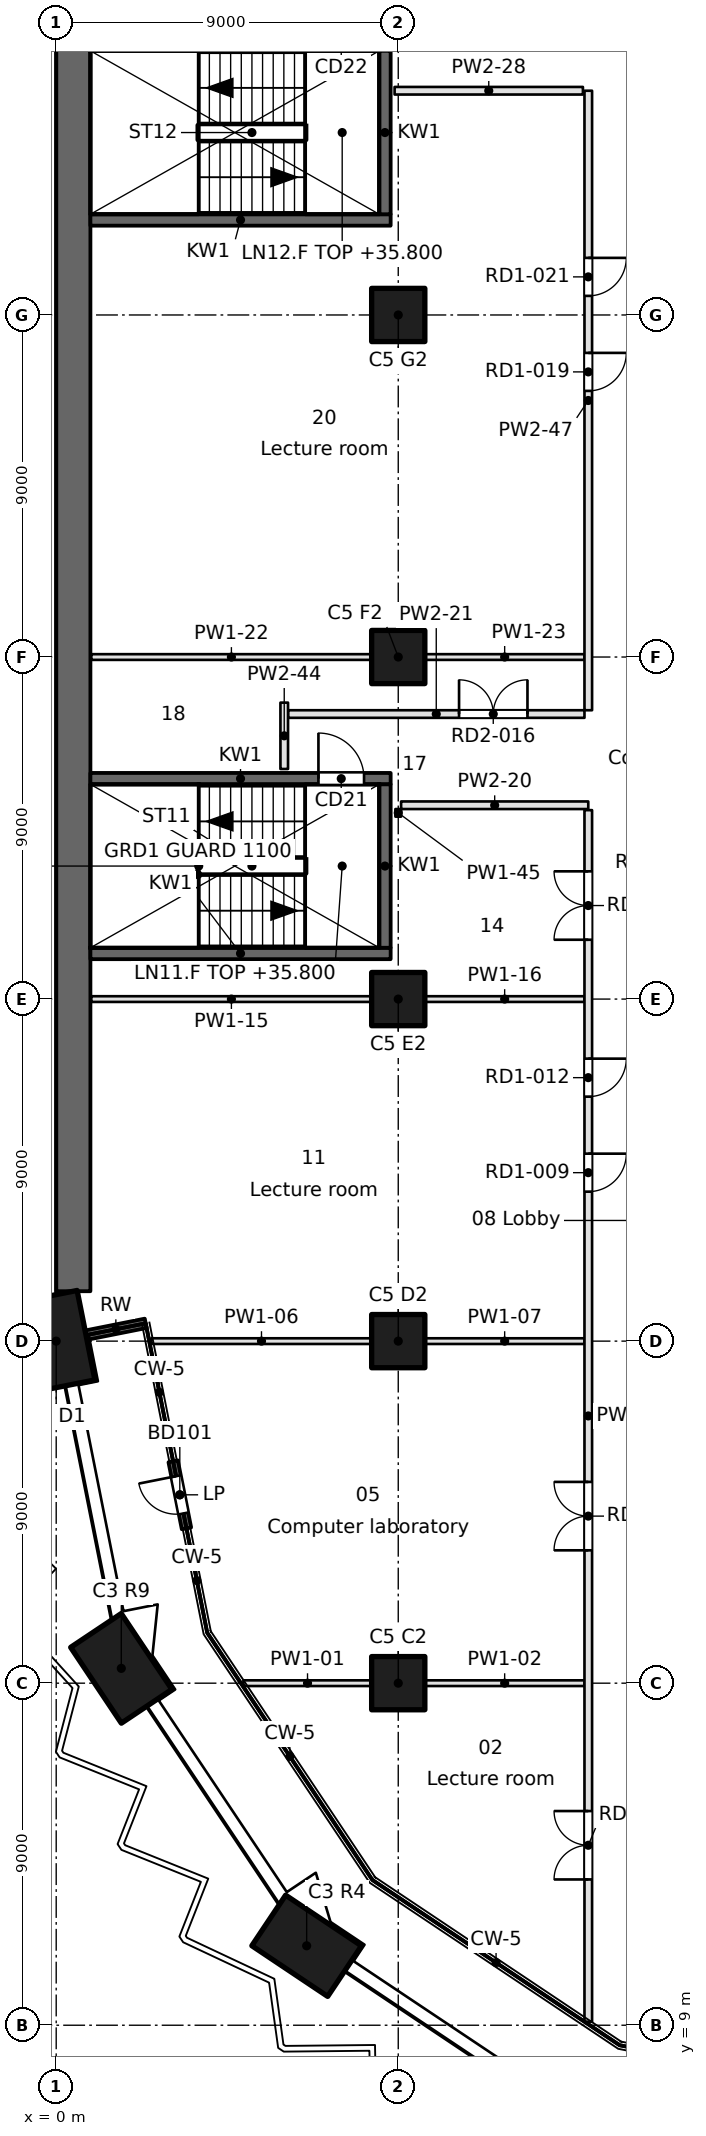
"""IFC4 building model, lengths in metres.
Left out: names, types, materials, properties, quantities, classifications, styles, units other than length and angle.
Written with IfcOpenShell. Run it as: python <this file> out.ifc"""

import sys

from ifc_helpers import new_model, si_unit, direction, frame, frame_2d, origin, origin_2d, place, context, subcontext, project, spatial, rectangle, extrude, element, fill, save


model = new_model("IFC4")
c1 = context("Model", 3, precision=1e-05, world=origin(), true_north=direction((0.0, 1.0)))
c2 = subcontext(c1, "Body", "Model", "MODEL_VIEW")
j1 = project(units=[si_unit("LENGTHUNIT", "METRE"), si_unit("PLANEANGLEUNIT", "RADIAN")], contexts=[c1])
p1 = place(None, origin())
s1 = spatial("IfcSite", under=j1, at=p1, CompositionType="ELEMENT")
p2 = place(p1, origin())
s2 = spatial("IfcBuilding", under=s1, at=p2, CompositionType="ELEMENT")
p3 = place(p2, frame((0.0, 0.0, 35.8)))
s3 = spatial("IfcBuildingStorey", under=s2, at=p3, CompositionType="ELEMENT", Elevation=35.8)
for number, where, z_axis, x_axis in (
    (1, (6.59, 11.09, 0.0), (0.0, 0.0, 1.0), (-0.831, 0.556, 0.0)),
    (2, (1.713, 18.39, 0.0), (0.0, 0.0, 1.0), (-0.556, 0.831, 0.0)),
    (3, (0.0, 27.0, 0.0), (0.0, 0.0, 1.0), (-0.195, 0.981, 0.0)),
):
    element("IfcColumn", number, at=place(p3, frame(where, z_axis=z_axis, x_axis=x_axis)), inside=s3, PredefinedType="COLUMN", context=c2, shape_type="SweptSolid", body=[
        extrude(rectangle(XDim=2.4, YDim=1.6, at=origin_2d()), origin(), (0.0, 0.0, 1.0), 3.7),
    ])
for number, where, z_axis, x_axis in (
    (4, (9.0, 18.0, 0.0), (0.0, 0.0, 1.0), (1.0, 0.0, 0.0)),
    (5, (9.0, 27.0, 0.0), (0.0, 0.0, 1.0), (1.0, 0.0, 0.0)),
    (6, (9.0, 36.0, 0.0), (0.0, 0.0, 1.0), (1.0, 0.0, 0.0)),
    (7, (9.0, 45.0, 0.0), (0.0, 0.0, 1.0), (1.0, 0.0, 0.0)),
    (8, (9.0, 54.0, 0.0), (0.0, 0.0, 1.0), (1.0, 0.0, 0.0)),
):
    element("IfcColumn", number, at=place(p3, frame(where, z_axis=z_axis, x_axis=x_axis)), inside=s3, PredefinedType="COLUMN", context=c2, shape_type="SweptSolid", body=[
        extrude(rectangle(XDim=1.4, YDim=1.4, at=origin_2d()), origin(), (0.0, 0.0, 1.0), 3.7),
    ])
p4 = place(p3, frame((0.45, 94.5, 0.0), z_axis=(0.0, 0.0, 1.0), x_axis=(0.0, -1.0, 0.0)))
e9 = element("IfcWall", 9, at=p4, inside=s3, PredefinedType="SHEAR", context=c2, shape_type="SweptSolid", body=[
    extrude(rectangle(XDim=66.187, YDim=0.9, at=frame_2d((33.094, 0.0))), origin(), (0.0, 0.0, 1.0), 3.7),
])
p5 = place(p3, frame((0.784, 27.157, 0.0), z_axis=(0.0, 0.0, 1.0), x_axis=(0.980826234823, 0.19488431718, 0.0)))
e10 = element("IfcWall", 10, at=p5, inside=s3, PredefinedType="SOLIDWALL", context=c2, shape_type="SweptSolid", body=[
    extrude(rectangle(XDim=1.601, YDim=0.25, at=frame_2d((0.801, 0.0))), origin(), (0.0, 0.0, 1.0), 3.3),
])
p6 = place(p3, frame((3.077, 23.839, 0.0), z_axis=(0.0, 0.0, 1.0), x_axis=(0.195046569833, -0.980793982239, 0.0)))
e11 = element("IfcWall", 11, at=p6, inside=s3, PredefinedType="SOLIDWALL", context=c2, shape_type="SweptSolid", body=[
    extrude(rectangle(XDim=1.8, YDim=0.25, at=frame_2d((0.9, 0.0))), origin(), (0.0, 0.0, 1.0), 3.3),
])
p7 = place(p6, frame((0.4, 0.0, 0.0)))
e12 = element("IfcOpeningElement", 12, at=p7, cuts=e11, PredefinedType="OPENING", context=c2, shape_type="SweptSolid", body=[
    extrude(rectangle(XDim=1.0, YDim=2.1, at=frame_2d((0.5, 1.05))), frame((0.0, 0.125, 0.0), z_axis=(0.0, -1.0, 0.0), x_axis=(1.0, 0.0, 0.0)), (0.0, 0.0, 1.0), 0.25),
])
p8 = place(p3, frame((0.9, 37.2, -0.4), z_axis=(0.0, 0.0, 1.0), x_axis=(1.0, 0.0, 0.0)))
e13 = element("IfcWall", 13, at=p8, inside=s3, PredefinedType="SOLIDWALL", context=c2, shape_type="SweptSolid", body=[
    extrude(rectangle(XDim=7.9, YDim=0.3, at=frame_2d((3.95, 0.0))), origin(), (0.0, 0.0, 1.0), 3.7),
])
p9 = place(p3, frame((0.9, 41.8, -0.4), z_axis=(0.0, 0.0, 1.0), x_axis=(1.0, 0.0, 0.0)))
e14 = element("IfcWall", 14, at=p9, inside=s3, PredefinedType="SOLIDWALL", context=c2, shape_type="SweptSolid", body=[
    extrude(rectangle(XDim=7.9, YDim=0.3, at=frame_2d((3.95, 0.0))), origin(), (0.0, 0.0, 1.0), 3.7),
])
p10 = place(p9, frame((6.0, 0.0, 0.4)))
e15 = element("IfcOpeningElement", 15, at=p10, cuts=e14, PredefinedType="OPENING", context=c2, shape_type="SweptSolid", body=[
    extrude(rectangle(XDim=1.2, YDim=2.1, at=frame_2d((0.6, 1.05))), frame((0.0, 0.15, 0.0), z_axis=(0.0, -1.0, 0.0), x_axis=(1.0, 0.0, 0.0)), (0.0, 0.0, 1.0), 0.3),
])
p11 = place(p3, frame((0.9, 56.5, -0.4), z_axis=(0.0, 0.0, 1.0), x_axis=(1.0, 0.0, 0.0)))
e16 = element("IfcWall", 16, at=p11, inside=s3, PredefinedType="SOLIDWALL", context=c2, shape_type="SweptSolid", body=[
    extrude(rectangle(XDim=7.9, YDim=0.3, at=frame_2d((3.95, 0.0))), origin(), (0.0, 0.0, 1.0), 3.7),
])
p12 = place(p3, frame((8.65, 37.35, -0.4), z_axis=(0.0, 0.0, 1.0), x_axis=(0.0, 1.0, 0.0)))
e17 = element("IfcWall", 17, at=p12, inside=s3, PredefinedType="SOLIDWALL", context=c2, shape_type="SweptSolid", body=[
    extrude(rectangle(XDim=4.3, YDim=0.3, at=frame_2d((2.15, 0.0))), origin(), (0.0, 0.0, 1.0), 3.7),
])
p13 = place(p3, frame((8.65, 56.65, -0.4), z_axis=(0.0, 0.0, 1.0), x_axis=(0.0, 1.0, 0.0)))
e18 = element("IfcWall", 18, at=p13, inside=s3, PredefinedType="SOLIDWALL", context=c2, shape_type="SweptSolid", body=[
    extrude(rectangle(XDim=4.3, YDim=0.3, at=frame_2d((2.15, 0.0))), origin(), (0.0, 0.0, 1.0), 3.7),
])
p14 = place(p3, frame((4.926, 18.0, 0.0), z_axis=(0.0, 0.0, 1.0), x_axis=(1.0, 0.0, 0.0)))
e19 = element("IfcWall", 19, at=p14, inside=s3, PredefinedType="PARTITIONING", context=c2, shape_type="SweptSolid", body=[
    extrude(rectangle(XDim=3.375, YDim=0.15, at=frame_2d((1.687, 0.0))), origin(), (0.0, 0.0, 1.0), 3.3),
])
p15 = place(p3, frame((9.7, 18.0, 0.0), z_axis=(0.0, 0.0, 1.0), x_axis=(1.0, 0.0, 0.0)))
e20 = element("IfcWall", 20, at=p15, inside=s3, PredefinedType="PARTITIONING", context=c2, shape_type="SweptSolid", body=[
    extrude(rectangle(XDim=4.2, YDim=0.15, at=frame_2d((2.1, 0.0))), origin(), (0.0, 0.0, 1.0), 3.3),
])
p16 = place(p3, frame((2.503, 27.0, 0.0), z_axis=(0.0, 0.0, 1.0), x_axis=(1.0, 0.0, 0.0)))
e21 = element("IfcWall", 21, at=p16, inside=s3, PredefinedType="PARTITIONING", context=c2, shape_type="SweptSolid", body=[
    extrude(rectangle(XDim=5.797, YDim=0.15, at=frame_2d((2.898, 0.0))), origin(), (0.0, 0.0, 1.0), 3.3),
])
p17 = place(p3, frame((9.7, 27.0, 0.0), z_axis=(0.0, 0.0, 1.0), x_axis=(1.0, 0.0, 0.0)))
e22 = element("IfcWall", 22, at=p17, inside=s3, PredefinedType="PARTITIONING", context=c2, shape_type="SweptSolid", body=[
    extrude(rectangle(XDim=4.2, YDim=0.15, at=frame_2d((2.1, 0.0))), origin(), (0.0, 0.0, 1.0), 3.3),
])
p18 = place(p3, frame((0.92, 36.0, 0.0), z_axis=(0.0, 0.0, 1.0), x_axis=(1.0, 0.0, 0.0)))
e23 = element("IfcWall", 23, at=p18, inside=s3, PredefinedType="PARTITIONING", context=c2, shape_type="SweptSolid", body=[
    extrude(rectangle(XDim=7.38, YDim=0.15, at=frame_2d((3.69, 0.0))), origin(), (0.0, 0.0, 1.0), 3.3),
])
p19 = place(p3, frame((9.7, 36.0, 0.0), z_axis=(0.0, 0.0, 1.0), x_axis=(1.0, 0.0, 0.0)))
e24 = element("IfcWall", 24, at=p19, inside=s3, PredefinedType="PARTITIONING", context=c2, shape_type="SweptSolid", body=[
    extrude(rectangle(XDim=4.2, YDim=0.15, at=frame_2d((2.1, 0.0))), origin(), (0.0, 0.0, 1.0), 3.3),
])
p20 = place(p3, frame((14.0, 41.1, 0.0), z_axis=(0.0, 0.0, 1.0), x_axis=(-1.0, 0.0, 0.0)))
e25 = element("IfcWall", 25, at=p20, inside=s3, PredefinedType="PARTITIONING", context=c2, shape_type="SweptSolid", body=[
    extrude(rectangle(XDim=4.925, YDim=0.2, at=frame_2d((2.462, 0.0))), origin(), (0.0, 0.0, 1.0), 3.3),
])
p21 = place(p3, frame((6.1, 43.5, 0.0), z_axis=(0.0, 0.0, 1.0), x_axis=(1.0, 0.0, 0.0)))
e26 = element("IfcWall", 26, at=p21, inside=s3, PredefinedType="PARTITIONING", context=c2, shape_type="SweptSolid", body=[
    extrude(rectangle(XDim=7.8, YDim=0.2, at=frame_2d((3.9, 0.0))), origin(), (0.0, 0.0, 1.0), 3.3),
])
p22 = place(p21, frame((4.5, 0.0, 0.0)))
e27 = element("IfcOpeningElement", 27, at=p22, cuts=e26, PredefinedType="OPENING", context=c2, shape_type="SweptSolid", body=[
    extrude(rectangle(XDim=1.8, YDim=2.1, at=frame_2d((0.9, 1.05))), frame((0.0, 0.1, 0.0), z_axis=(0.0, -1.0, 0.0), x_axis=(1.0, 0.0, 0.0)), (0.0, 0.0, 1.0), 0.2),
])
p23 = place(p3, frame((0.92, 45.0, 0.0), z_axis=(0.0, 0.0, 1.0), x_axis=(1.0, 0.0, 0.0)))
e28 = element("IfcWall", 28, at=p23, inside=s3, PredefinedType="PARTITIONING", context=c2, shape_type="SweptSolid", body=[
    extrude(rectangle(XDim=7.38, YDim=0.15, at=frame_2d((3.69, 0.0))), origin(), (0.0, 0.0, 1.0), 3.3),
])
p24 = place(p3, frame((9.7, 45.0, 0.0), z_axis=(0.0, 0.0, 1.0), x_axis=(1.0, 0.0, 0.0)))
e29 = element("IfcWall", 29, at=p24, inside=s3, PredefinedType="PARTITIONING", context=c2, shape_type="SweptSolid", body=[
    extrude(rectangle(XDim=4.2, YDim=0.15, at=frame_2d((2.1, 0.0))), origin(), (0.0, 0.0, 1.0), 3.3),
])
p25 = place(p3, frame((13.859, 59.9, 0.0), z_axis=(0.0, 0.0, 1.0), x_axis=(-1.0, 0.0, 0.0)))
e30 = element("IfcWall", 30, at=p25, inside=s3, PredefinedType="PARTITIONING", context=c2, shape_type="SweptSolid", body=[
    extrude(rectangle(XDim=4.955, YDim=0.2, at=frame_2d((2.478, 0.0))), origin(), (0.0, 0.0, 1.0), 3.3),
])
p26 = place(p3, frame((6.0, 42.054, 0.0), z_axis=(0.0, 0.0, 1.0), x_axis=(0.0, 1.0, 0.0)))
e31 = element("IfcWall", 31, at=p26, inside=s3, PredefinedType="PARTITIONING", context=c2, shape_type="SweptSolid", body=[
    extrude(rectangle(XDim=1.746, YDim=0.2, at=frame_2d((0.873, 0.0))), origin(), (0.0, 0.0, 1.0), 3.3),
])
p27 = place(p3, frame((9.0, 41.0, 0.0), z_axis=(0.0, 0.0, 1.0), x_axis=(0.0, -1.0, 0.0)))
e32 = element("IfcWall", 32, at=p27, inside=s3, PredefinedType="PARTITIONING", context=c2, shape_type="SweptSolid", body=[
    extrude(rectangle(XDim=0.2, YDim=0.15, at=frame_2d((0.1, 0.0))), origin(), (0.0, 0.0, 1.0), 3.3),
])
p28 = place(p3, frame((14.0, 9.092, 0.0), z_axis=(0.0, 0.0, 1.0), x_axis=(0.0, 1.0, 0.0)))
e33 = element("IfcWall", 33, at=p28, inside=s3, PredefinedType="PARTITIONING", context=c2, shape_type="SweptSolid", body=[
    extrude(rectangle(XDim=31.88, YDim=0.2, at=frame_2d((15.94, 0.0))), origin(), (0.0, 0.0, 1.0), 3.3),
])
p29 = place(p28, frame((3.744, 0.0, 0.0)))
e34 = element("IfcOpeningElement", 34, at=p29, cuts=e33, PredefinedType="OPENING", context=c2, shape_type="SweptSolid", body=[
    extrude(rectangle(XDim=1.8, YDim=2.1, at=frame_2d((0.9, 1.05))), frame((0.0, 0.1, 0.0), z_axis=(0.0, -1.0, 0.0), x_axis=(1.0, 0.0, 0.0)), (0.0, 0.0, 1.0), 0.2),
])
p30 = place(p28, frame((12.404, 0.0, 0.0)))
e35 = element("IfcOpeningElement", 35, at=p30, cuts=e33, PredefinedType="OPENING", context=c2, shape_type="SweptSolid", body=[
    extrude(rectangle(XDim=1.8, YDim=2.1, at=frame_2d((0.9, 1.05))), frame((0.0, 0.1, 0.0), z_axis=(0.0, -1.0, 0.0), x_axis=(1.0, 0.0, 0.0)), (0.0, 0.0, 1.0), 0.2),
])
p31 = place(p28, frame((21.841, 0.0, 0.0)))
e36 = element("IfcOpeningElement", 36, at=p31, cuts=e33, PredefinedType="OPENING", context=c2, shape_type="SweptSolid", body=[
    extrude(rectangle(XDim=1.0, YDim=2.1, at=frame_2d((0.5, 1.05))), frame((0.0, 0.1, 0.0), z_axis=(0.0, -1.0, 0.0), x_axis=(1.0, 0.0, 0.0)), (0.0, 0.0, 1.0), 0.2),
])
p32 = place(p28, frame((24.341, 0.0, 0.0)))
e37 = element("IfcOpeningElement", 37, at=p32, cuts=e33, PredefinedType="OPENING", context=c2, shape_type="SweptSolid", body=[
    extrude(rectangle(XDim=1.0, YDim=2.1, at=frame_2d((0.5, 1.05))), frame((0.0, 0.1, 0.0), z_axis=(0.0, -1.0, 0.0), x_axis=(1.0, 0.0, 0.0)), (0.0, 0.0, 1.0), 0.2),
])
p33 = place(p28, frame((28.469, 0.0, 0.0)))
e38 = element("IfcOpeningElement", 38, at=p33, cuts=e33, PredefinedType="OPENING", context=c2, shape_type="SweptSolid", body=[
    extrude(rectangle(XDim=1.8, YDim=2.1, at=frame_2d((0.9, 1.05))), frame((0.0, 0.1, 0.0), z_axis=(0.0, -1.0, 0.0), x_axis=(1.0, 0.0, 0.0)), (0.0, 0.0, 1.0), 0.2),
])
p34 = place(p3, frame((14.0, 43.6, 0.0), z_axis=(0.0, 0.0, 1.0), x_axis=(0.0, 1.0, 0.0)))
e39 = element("IfcWall", 39, at=p34, inside=s3, PredefinedType="PARTITIONING", context=c2, shape_type="SweptSolid", body=[
    extrude(rectangle(XDim=16.3, YDim=0.2, at=frame_2d((8.15, 0.0))), origin(), (0.0, 0.0, 1.0), 3.3),
])
p35 = place(p34, frame((8.402, 0.0, 0.0)))
e40 = element("IfcOpeningElement", 40, at=p35, cuts=e39, PredefinedType="OPENING", context=c2, shape_type="SweptSolid", body=[
    extrude(rectangle(XDim=1.0, YDim=2.1, at=frame_2d((0.5, 1.05))), frame((0.0, 0.1, 0.0), z_axis=(0.0, -1.0, 0.0), x_axis=(1.0, 0.0, 0.0)), (0.0, 0.0, 1.0), 0.2),
])
p36 = place(p34, frame((10.902, 0.0, 0.0)))
e41 = element("IfcOpeningElement", 41, at=p36, cuts=e39, PredefinedType="OPENING", context=c2, shape_type="SweptSolid", body=[
    extrude(rectangle(XDim=1.0, YDim=2.1, at=frame_2d((0.5, 1.05))), frame((0.0, 0.1, 0.0), z_axis=(0.0, -1.0, 0.0), x_axis=(1.0, 0.0, 0.0)), (0.0, 0.0, 1.0), 0.2),
])
p37 = place(p7, frame((1.0, 0.0, 0.0), z_axis=(0.0, 0.0, 1.0), x_axis=(-1.0, 0.0, 0.0)))
e42 = element("IfcDoor", 42, at=p37, inside=s3, OperationType="SINGLE_SWING_RIGHT", PredefinedType="DOOR", context=c2, shape_type="SweptSolid", body=[
    extrude(rectangle(XDim=1.0, YDim=2.1, at=frame_2d((0.5, 1.05))), frame((0.0, 0.025, 0.0), z_axis=(0.0, -1.0, 0.0), x_axis=(1.0, 0.0, 0.0)), (0.0, 0.0, 1.0), 0.05),
])
fill(e12, e42)
p38 = place(p10, origin())
e43 = element("IfcDoor", 43, at=p38, inside=s3, OperationType="SINGLE_SWING_LEFT", PredefinedType="DOOR", context=c2, shape_type="SweptSolid", body=[
    extrude(rectangle(XDim=1.2, YDim=2.1, at=frame_2d((0.6, 1.05))), frame((0.0, 0.025, 0.0), z_axis=(0.0, -1.0, 0.0), x_axis=(1.0, 0.0, 0.0)), (0.0, 0.0, 1.0), 0.05),
])
fill(e15, e43)
p39 = place(p29, origin())
e44 = element("IfcDoor", 44, at=p39, inside=s3, OperationType="DOUBLE_DOOR_SINGLE_SWING", PredefinedType="DOOR", context=c2, shape_type="SweptSolid", body=[
    extrude(rectangle(XDim=1.8, YDim=2.1, at=frame_2d((0.9, 1.05))), frame((0.0, 0.025, 0.0), z_axis=(0.0, -1.0, 0.0), x_axis=(1.0, 0.0, 0.0)), (0.0, 0.0, 1.0), 0.05),
])
fill(e34, e44)
p40 = place(p30, origin())
e45 = element("IfcDoor", 45, at=p40, inside=s3, OperationType="DOUBLE_DOOR_SINGLE_SWING", PredefinedType="DOOR", context=c2, shape_type="SweptSolid", body=[
    extrude(rectangle(XDim=1.8, YDim=2.1, at=frame_2d((0.9, 1.05))), frame((0.0, 0.025, 0.0), z_axis=(0.0, -1.0, 0.0), x_axis=(1.0, 0.0, 0.0)), (0.0, 0.0, 1.0), 0.05),
])
fill(e35, e45)
p41 = place(p31, frame((1.0, 0.0, 0.0), z_axis=(0.0, 0.0, 1.0), x_axis=(-1.0, 0.0, 0.0)))
e46 = element("IfcDoor", 46, at=p41, inside=s3, OperationType="SINGLE_SWING_LEFT", PredefinedType="DOOR", context=c2, shape_type="SweptSolid", body=[
    extrude(rectangle(XDim=1.0, YDim=2.1, at=frame_2d((0.5, 1.05))), frame((0.0, 0.025, 0.0), z_axis=(0.0, -1.0, 0.0), x_axis=(1.0, 0.0, 0.0)), (0.0, 0.0, 1.0), 0.05),
])
fill(e36, e46)
p42 = place(p32, frame((1.0, 0.0, 0.0), z_axis=(0.0, 0.0, 1.0), x_axis=(-1.0, 0.0, 0.0)))
e47 = element("IfcDoor", 47, at=p42, inside=s3, OperationType="SINGLE_SWING_LEFT", PredefinedType="DOOR", context=c2, shape_type="SweptSolid", body=[
    extrude(rectangle(XDim=1.0, YDim=2.1, at=frame_2d((0.5, 1.05))), frame((0.0, 0.025, 0.0), z_axis=(0.0, -1.0, 0.0), x_axis=(1.0, 0.0, 0.0)), (0.0, 0.0, 1.0), 0.05),
])
fill(e37, e47)
p43 = place(p33, origin())
e48 = element("IfcDoor", 48, at=p43, inside=s3, OperationType="DOUBLE_DOOR_SINGLE_SWING", PredefinedType="DOOR", context=c2, shape_type="SweptSolid", body=[
    extrude(rectangle(XDim=1.8, YDim=2.1, at=frame_2d((0.9, 1.05))), frame((0.0, 0.025, 0.0), z_axis=(0.0, -1.0, 0.0), x_axis=(1.0, 0.0, 0.0)), (0.0, 0.0, 1.0), 0.05),
])
fill(e38, e48)
p44 = place(p22, origin())
e49 = element("IfcDoor", 49, at=p44, inside=s3, OperationType="DOUBLE_DOOR_SINGLE_SWING", PredefinedType="DOOR", context=c2, shape_type="SweptSolid", body=[
    extrude(rectangle(XDim=1.8, YDim=2.1, at=frame_2d((0.9, 1.05))), frame((0.0, 0.025, 0.0), z_axis=(0.0, -1.0, 0.0), x_axis=(1.0, 0.0, 0.0)), (0.0, 0.0, 1.0), 0.05),
])
fill(e27, e49)
p45 = place(p35, frame((1.0, 0.0, 0.0), z_axis=(0.0, 0.0, 1.0), x_axis=(-1.0, 0.0, 0.0)))
e50 = element("IfcDoor", 50, at=p45, inside=s3, OperationType="SINGLE_SWING_LEFT", PredefinedType="DOOR", context=c2, shape_type="SweptSolid", body=[
    extrude(rectangle(XDim=1.0, YDim=2.1, at=frame_2d((0.5, 1.05))), frame((0.0, 0.025, 0.0), z_axis=(0.0, -1.0, 0.0), x_axis=(1.0, 0.0, 0.0)), (0.0, 0.0, 1.0), 0.05),
])
fill(e40, e50)
p46 = place(p36, frame((1.0, 0.0, 0.0), z_axis=(0.0, 0.0, 1.0), x_axis=(-1.0, 0.0, 0.0)))
e51 = element("IfcDoor", 51, at=p46, inside=s3, OperationType="SINGLE_SWING_LEFT", PredefinedType="DOOR", context=c2, shape_type="SweptSolid", body=[
    extrude(rectangle(XDim=1.0, YDim=2.1, at=frame_2d((0.5, 1.05))), frame((0.0, 0.025, 0.0), z_axis=(0.0, -1.0, 0.0), x_axis=(1.0, 0.0, 0.0)), (0.0, 0.0, 1.0), 0.05),
])
fill(e41, e51)
save(model, sys.argv[1])
